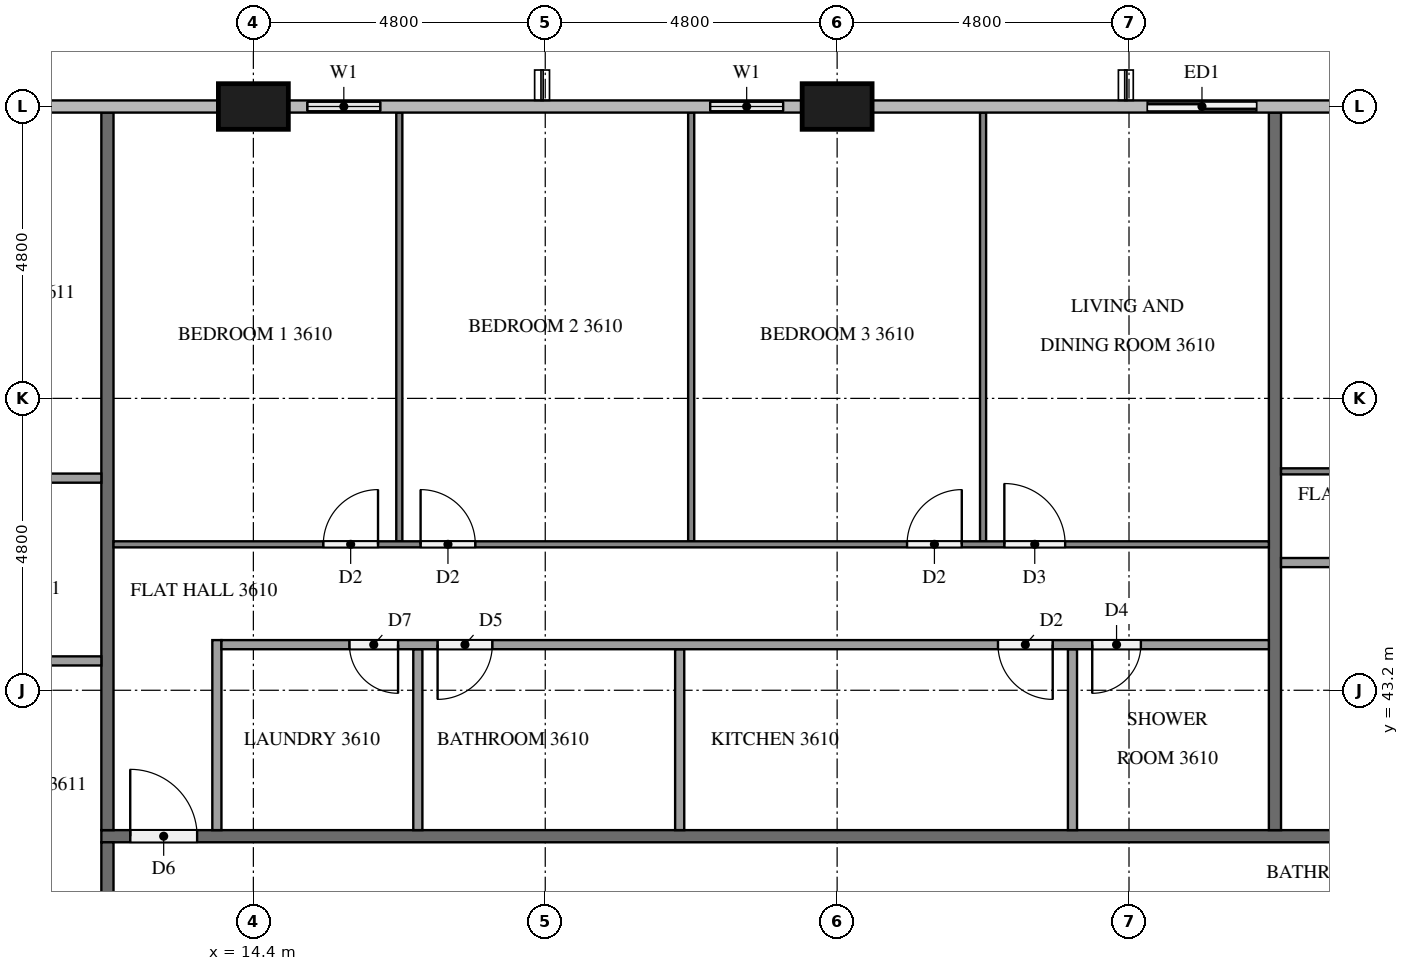
"""IFC4 building model, lengths in metres.
Left out: names, types, materials, properties, quantities, classifications, styles, units other than length and angle.
Written with IfcOpenShell. Run it as: python <this file> out.ifc"""

import sys

from ifc_helpers import new_model, si_unit, direction, frame, frame_2d, origin, origin_2d, place, context, subcontext, project, spatial, rectangle, extrude, element, fill, save


model = new_model("IFC4")
c1 = context("Model", 3, precision=1e-05, world=origin(), true_north=direction((0.0, 1.0)))
c2 = subcontext(c1, "Body", "Model", "MODEL_VIEW")
j1 = project(units=[si_unit("LENGTHUNIT", "METRE"), si_unit("PLANEANGLEUNIT", "RADIAN")], contexts=[c1])
p1 = place(None, origin())
s1 = spatial("IfcSite", under=j1, at=p1, CompositionType="ELEMENT")
p2 = place(p1, origin())
s2 = spatial("IfcBuilding", under=s1, at=p2, CompositionType="ELEMENT")
p3 = place(p2, frame((0.0, 0.0, 140.1)))
s3 = spatial("IfcBuildingStorey", under=s2, at=p3, CompositionType="ELEMENT", Elevation=140.1)
for number, where, z_axis, x_axis in (
    (1, (24.0, 52.8, 0.0), (0.0, 0.0, 1.0), (1.0, 0.0, 0.0)),
    (2, (14.4, 52.8, 0.0), (0.0, 0.0, 1.0), (1.0, 0.0, 0.0)),
):
    element("IfcColumn", number, at=place(p3, frame(where, z_axis=z_axis, x_axis=x_axis)), inside=s3, PredefinedType="COLUMN", context=c2, shape_type="SweptSolid", body=[
        extrude(rectangle(XDim=1.15, YDim=0.75, at=origin_2d()), origin(), (0.0, 0.0, 1.0), 3.1),
    ])
p4 = place(p3, frame((31.2, 52.8, 0.0), z_axis=(0.0, 0.0, 1.0), x_axis=(-1.0, 0.0, 0.0)))
e3 = element("IfcWall", 3, at=p4, inside=s3, PredefinedType="SOLIDWALL", context=c2, shape_type="SweptSolid", body=[
    extrude(rectangle(XDim=2.4, YDim=0.15, at=frame_2d((1.2, 0.0))), origin(), (0.0, 0.0, 1.0), 3.1),
])
p5 = place(p4, frame((0.3, 0.0, 0.0)))
e4 = element("IfcOpeningElement", 4, at=p5, cuts=e3, PredefinedType="OPENING", context=c2, shape_type="SweptSolid", body=[
    extrude(rectangle(XDim=1.8, YDim=2.4, at=frame_2d((0.9, 1.2))), frame((0.0, 0.085, 0.0), z_axis=(0.0, -1.0, 0.0), x_axis=(1.0, 0.0, 0.0)), (0.0, 0.0, 1.0), 0.17),
])
p6 = place(p3, frame((23.425, 52.8, 0.0), z_axis=(0.0, 0.0, 1.0), x_axis=(-1.0, 0.0, 0.0)))
e5 = element("IfcWall", 5, at=p6, inside=s3, PredefinedType="SOLIDWALL", context=c2, shape_type="SweptSolid", body=[
    extrude(rectangle(XDim=1.825, YDim=0.15, at=frame_2d((0.913, 0.0))), origin(), (0.0, 0.0, 1.0), 3.1),
])
p7 = place(p6, frame((0.312, 0.0, 0.9)))
e6 = element("IfcOpeningElement", 6, at=p7, cuts=e5, PredefinedType="OPENING", context=c2, shape_type="SweptSolid", body=[
    extrude(rectangle(XDim=1.2, YDim=1.4, at=frame_2d((0.6, 0.7))), frame((0.0, 0.085, 0.0), z_axis=(0.0, -1.0, 0.0), x_axis=(1.0, 0.0, 0.0)), (0.0, 0.0, 1.0), 0.17),
])
p8 = place(p3, frame((16.8, 52.8, 0.0), z_axis=(0.0, 0.0, 1.0), x_axis=(-1.0, 0.0, 0.0)))
e7 = element("IfcWall", 7, at=p8, inside=s3, PredefinedType="SOLIDWALL", context=c2, shape_type="SweptSolid", body=[
    extrude(rectangle(XDim=1.825, YDim=0.15, at=frame_2d((0.913, 0.0))), origin(), (0.0, 0.0, 1.0), 3.1),
])
p9 = place(p8, frame((0.312, 0.0, 0.9)))
e8 = element("IfcOpeningElement", 8, at=p9, cuts=e7, PredefinedType="OPENING", context=c2, shape_type="SweptSolid", body=[
    extrude(rectangle(XDim=1.2, YDim=1.4, at=frame_2d((0.6, 0.7))), frame((0.0, 0.085, 0.0), z_axis=(0.0, -1.0, 0.0), x_axis=(1.0, 0.0, 0.0)), (0.0, 0.0, 1.0), 0.17),
])
p10 = place(p3, frame((11.9, 40.8, 0.0), z_axis=(0.0, 0.0, 1.0), x_axis=(1.0, 0.0, 0.0)))
e9 = element("IfcWall", 9, at=p10, inside=s3, PredefinedType="PARTITIONING", context=c2, shape_type="SweptSolid", body=[
    extrude(rectangle(XDim=38.6, YDim=0.2, at=frame_2d((19.3, 0.0))), origin(), (0.0, 0.0, 1.0), 3.1),
])
p11 = place(p10, frame((37.075, 0.0, 0.0)))
e10 = element("IfcOpeningElement", 10, at=p11, cuts=e9, PredefinedType="OPENING", context=c2, shape_type="SweptSolid", body=[
    extrude(rectangle(XDim=1.0, YDim=2.1, at=frame_2d((0.5, 1.05))), frame((0.0, 0.11, 0.0), z_axis=(0.0, -1.0, 0.0), x_axis=(1.0, 0.0, 0.0)), (0.0, 0.0, 1.0), 0.22),
])
p12 = place(p10, frame((25.075, 0.0, 0.0)))
e11 = element("IfcOpeningElement", 11, at=p12, cuts=e9, PredefinedType="OPENING", context=c2, shape_type="SweptSolid", body=[
    extrude(rectangle(XDim=1.0, YDim=2.1, at=frame_2d((0.5, 1.05))), frame((0.0, 0.11, 0.0), z_axis=(0.0, -1.0, 0.0), x_axis=(1.0, 0.0, 0.0)), (0.0, 0.0, 1.0), 0.22),
])
p13 = place(p10, frame((0.475, 0.0, 0.0)))
e12 = element("IfcOpeningElement", 12, at=p13, cuts=e9, PredefinedType="OPENING", context=c2, shape_type="SweptSolid", body=[
    extrude(rectangle(XDim=1.1, YDim=2.1, at=frame_2d((0.55, 1.05))), frame((0.0, 0.11, 0.0), z_axis=(0.0, -1.0, 0.0), x_axis=(1.0, 0.0, 0.0)), (0.0, 0.0, 1.0), 0.22),
])
p14 = place(p3, frame((12.0, 37.9, 0.0), z_axis=(0.0, 0.0, 1.0), x_axis=(0.0, 1.0, 0.0)))
e13 = element("IfcWall", 13, at=p14, inside=s3, PredefinedType="PARTITIONING", context=c2, shape_type="SweptSolid", body=[
    extrude(rectangle(XDim=2.8, YDim=0.2, at=frame_2d((1.4, 0.0))), origin(), (0.0, 0.0, 1.0), 3.1),
])
p15 = place(p14, frame((0.325, 0.0, 0.0)))
e14 = element("IfcOpeningElement", 14, at=p15, cuts=e13, PredefinedType="OPENING", context=c2, shape_type="SweptSolid", body=[
    extrude(rectangle(XDim=1.0, YDim=2.1, at=frame_2d((0.5, 1.05))), frame((0.0, 0.11, 0.0), z_axis=(0.0, -1.0, 0.0), x_axis=(1.0, 0.0, 0.0)), (0.0, 0.0, 1.0), 0.22),
])
for number, where, z_axis, x_axis in (
    (15, (31.2, 52.7, 0.0), (0.0, 0.0, 1.0), (0.0, -1.0, 0.0)),
    (16, (12.0, 52.7, 0.0), (0.0, 0.0, 1.0), (0.0, -1.0, 0.0)),
):
    element("IfcWall", number, at=place(p3, frame(where, z_axis=z_axis, x_axis=x_axis)), inside=s3, PredefinedType="PARTITIONING", context=c2, shape_type="SweptSolid", body=[
        extrude(rectangle(XDim=11.8, YDim=0.2, at=frame_2d((5.9, 0.0))), origin(), (0.0, 0.0, 1.0), 3.1),
    ])
p16 = place(p3, frame((31.3, 46.8, 0.0), z_axis=(0.0, 0.0, 1.0), x_axis=(1.0, 0.0, 0.0)))
e17 = element("IfcWall", 17, at=p16, inside=s3, PredefinedType="PARTITIONING", context=c2, shape_type="SweptSolid", body=[
    extrude(rectangle(XDim=7.0, YDim=0.1, at=frame_2d((3.5, 0.0))), origin(), (0.0, 0.0, 1.0), 3.1),
])
p17 = place(p16, frame((5.7, 0.0, 0.0)))
e18 = element("IfcOpeningElement", 18, at=p17, cuts=e17, PredefinedType="OPENING", context=c2, shape_type="SweptSolid", body=[
    extrude(rectangle(XDim=1.0, YDim=2.1, at=frame_2d((0.5, 1.05))), frame((0.0, 0.06, 0.0), z_axis=(0.0, -1.0, 0.0), x_axis=(1.0, 0.0, 0.0)), (0.0, 0.0, 1.0), 0.12),
])
p18 = place(p3, frame((36.525, 45.3, 0.0), z_axis=(0.0, 0.0, 1.0), x_axis=(-1.0, 0.0, 0.0)))
e19 = element("IfcWall", 19, at=p18, inside=s3, PredefinedType="PARTITIONING", context=c2, shape_type="SweptSolid", body=[
    extrude(rectangle(XDim=5.225, YDim=0.15, at=frame_2d((2.612, 0.0))), origin(), (0.0, 0.0, 1.0), 3.1),
])
p19 = place(p18, frame((1.91, 0.0, 0.0)))
e20 = element("IfcOpeningElement", 20, at=p19, cuts=e19, PredefinedType="OPENING", context=c2, shape_type="SweptSolid", body=[
    extrude(rectangle(XDim=0.9, YDim=2.1, at=frame_2d((0.45, 1.05))), frame((0.0, 0.085, 0.0), z_axis=(0.0, -1.0, 0.0), x_axis=(1.0, 0.0, 0.0)), (0.0, 0.0, 1.0), 0.17),
])
p20 = place(p18, frame((3.46, 0.0, 0.0)))
e21 = element("IfcOpeningElement", 21, at=p20, cuts=e19, PredefinedType="OPENING", context=c2, shape_type="SweptSolid", body=[
    extrude(rectangle(XDim=0.8, YDim=2.1, at=frame_2d((0.4, 1.05))), frame((0.0, 0.085, 0.0), z_axis=(0.0, -1.0, 0.0), x_axis=(1.0, 0.0, 0.0)), (0.0, 0.0, 1.0), 0.17),
])
for number, where, z_axis, x_axis in (
    (22, (16.8, 45.65, 0.0), (0.0, 0.0, 1.0), (0.0, 1.0, 0.0)),
    (23, (21.6, 45.65, 0.0), (0.0, 0.0, 1.0), (0.0, 1.0, 0.0)),
    (24, (26.4, 45.65, 0.0), (0.0, 0.0, 1.0), (0.0, 1.0, 0.0)),
):
    element("IfcWall", number, at=place(p3, frame(where, z_axis=z_axis, x_axis=x_axis)), inside=s3, PredefinedType="PARTITIONING", context=c2, shape_type="SweptSolid", body=[
        extrude(rectangle(XDim=7.05, YDim=0.1, at=frame_2d((3.525, 0.0))), origin(), (0.0, 0.0, 1.0), 3.1),
    ])
p21 = place(p3, frame((12.1, 45.6, 0.0), z_axis=(0.0, 0.0, 1.0), x_axis=(1.0, 0.0, 0.0)))
e25 = element("IfcWall", 25, at=p21, inside=s3, PredefinedType="PARTITIONING", context=c2, shape_type="SweptSolid", body=[
    extrude(rectangle(XDim=19.0, YDim=0.1, at=frame_2d((9.5, 0.0))), origin(), (0.0, 0.0, 1.0), 3.1),
])
p22 = place(p21, frame((3.45, 0.0, 0.0)))
e26 = element("IfcOpeningElement", 26, at=p22, cuts=e25, PredefinedType="OPENING", context=c2, shape_type="SweptSolid", body=[
    extrude(rectangle(XDim=0.9, YDim=2.1, at=frame_2d((0.45, 1.05))), frame((0.0, 0.06, 0.0), z_axis=(0.0, -1.0, 0.0), x_axis=(1.0, 0.0, 0.0)), (0.0, 0.0, 1.0), 0.12),
])
p23 = place(p21, frame((5.05, 0.0, 0.0)))
e27 = element("IfcOpeningElement", 27, at=p23, cuts=e25, PredefinedType="OPENING", context=c2, shape_type="SweptSolid", body=[
    extrude(rectangle(XDim=0.9, YDim=2.1, at=frame_2d((0.45, 1.05))), frame((0.0, 0.06, 0.0), z_axis=(0.0, -1.0, 0.0), x_axis=(1.0, 0.0, 0.0)), (0.0, 0.0, 1.0), 0.12),
])
p24 = place(p21, frame((13.05, 0.0, 0.0)))
e28 = element("IfcOpeningElement", 28, at=p24, cuts=e25, PredefinedType="OPENING", context=c2, shape_type="SweptSolid", body=[
    extrude(rectangle(XDim=0.9, YDim=2.1, at=frame_2d((0.45, 1.05))), frame((0.0, 0.06, 0.0), z_axis=(0.0, -1.0, 0.0), x_axis=(1.0, 0.0, 0.0)), (0.0, 0.0, 1.0), 0.12),
])
p25 = place(p21, frame((14.65, 0.0, 0.0)))
e29 = element("IfcOpeningElement", 29, at=p25, cuts=e25, PredefinedType="OPENING", context=c2, shape_type="SweptSolid", body=[
    extrude(rectangle(XDim=1.0, YDim=2.1, at=frame_2d((0.5, 1.05))), frame((0.0, 0.06, 0.0), z_axis=(0.0, -1.0, 0.0), x_axis=(1.0, 0.0, 0.0)), (0.0, 0.0, 1.0), 0.12),
])
for number, where, z_axis, x_axis in (
    (30, (17.105, 40.9, 0.0), (0.0, 0.0, 1.0), (0.0, 1.0, 0.0)),
    (31, (21.411, 40.9, 0.0), (0.0, 0.0, 1.0), (0.0, 1.0, 0.0)),
    (32, (27.87, 40.9, 0.0), (0.0, 0.0, 1.0), (0.0, 1.0, 0.0)),
):
    element("IfcWall", number, at=place(p3, frame(where, z_axis=z_axis, x_axis=x_axis)), inside=s3, PredefinedType="PARTITIONING", context=c2, shape_type="SweptSolid", body=[
        extrude(rectangle(XDim=2.975, YDim=0.15, at=frame_2d((1.488, 0.0))), origin(), (0.0, 0.0, 1.0), 3.1),
    ])
p26 = place(p3, frame((13.8, 40.9, 0.0), z_axis=(0.0, 0.0, 1.0), x_axis=(0.0, 1.0, 0.0)))
e33 = element("IfcWall", 33, at=p26, inside=s3, PredefinedType="PARTITIONING", context=c2, shape_type="SweptSolid", body=[
    extrude(rectangle(XDim=3.125, YDim=0.15, at=frame_2d((1.562, 0.0))), origin(), (0.0, 0.0, 1.0), 3.1),
])
p27 = place(p3, frame((31.1, 43.95, 0.0), z_axis=(0.0, 0.0, 1.0), x_axis=(-1.0, 0.0, 0.0)))
e34 = element("IfcWall", 34, at=p27, inside=s3, PredefinedType="PARTITIONING", context=c2, shape_type="SweptSolid", body=[
    extrude(rectangle(XDim=17.225, YDim=0.15, at=frame_2d((8.613, 0.0))), origin(), (0.0, 0.0, 1.0), 3.1),
])
p28 = place(p27, frame((14.32, 0.0, 0.0)))
e35 = element("IfcOpeningElement", 35, at=p28, cuts=e34, PredefinedType="OPENING", context=c2, shape_type="SweptSolid", body=[
    extrude(rectangle(XDim=0.8, YDim=2.1, at=frame_2d((0.4, 1.05))), frame((0.0, 0.085, 0.0), z_axis=(0.0, -1.0, 0.0), x_axis=(1.0, 0.0, 0.0)), (0.0, 0.0, 1.0), 0.17),
])
p29 = place(p27, frame((12.77, 0.0, 0.0)))
e36 = element("IfcOpeningElement", 36, at=p29, cuts=e34, PredefinedType="OPENING", context=c2, shape_type="SweptSolid", body=[
    extrude(rectangle(XDim=0.9, YDim=2.1, at=frame_2d((0.45, 1.05))), frame((0.0, 0.085, 0.0), z_axis=(0.0, -1.0, 0.0), x_axis=(1.0, 0.0, 0.0)), (0.0, 0.0, 1.0), 0.17),
])
p30 = place(p27, frame((3.555, 0.0, 0.0)))
e37 = element("IfcOpeningElement", 37, at=p30, cuts=e34, PredefinedType="OPENING", context=c2, shape_type="SweptSolid", body=[
    extrude(rectangle(XDim=0.9, YDim=2.1, at=frame_2d((0.45, 1.05))), frame((0.0, 0.085, 0.0), z_axis=(0.0, -1.0, 0.0), x_axis=(1.0, 0.0, 0.0)), (0.0, 0.0, 1.0), 0.17),
])
p31 = place(p27, frame((2.105, 0.0, 0.0)))
e38 = element("IfcOpeningElement", 38, at=p31, cuts=e34, PredefinedType="OPENING", context=c2, shape_type="SweptSolid", body=[
    extrude(rectangle(XDim=0.8, YDim=2.1, at=frame_2d((0.4, 1.05))), frame((0.0, 0.085, 0.0), z_axis=(0.0, -1.0, 0.0), x_axis=(1.0, 0.0, 0.0)), (0.0, 0.0, 1.0), 0.17),
])
for number, where, z_axis, x_axis in (
    (39, (11.9, 43.683, 0.0), (0.0, 0.0, 1.0), (-1.0, 0.0, 0.0)),
    (40, (11.9, 46.688, 0.0), (0.0, 0.0, 1.0), (-1.0, 0.0, 0.0)),
):
    element("IfcWall", number, at=place(p3, frame(where, z_axis=z_axis, x_axis=x_axis)), inside=s3, PredefinedType="PARTITIONING", context=c2, shape_type="SweptSolid", body=[
        extrude(rectangle(XDim=2.975, YDim=0.15, at=frame_2d((1.487, 0.0))), origin(), (0.0, 0.0, 1.0), 3.1),
    ])
p32 = place(p5, origin())
e41 = element("IfcDoor", 41, at=p32, inside=s3, OperationType="SLIDING_TO_LEFT", PredefinedType="DOOR", context=c2, shape_type="SweptSolid", body=[
    extrude(rectangle(XDim=1.8, YDim=2.4, at=frame_2d((0.9, 1.2))), frame((0.0, 0.025, 0.0), z_axis=(0.0, -1.0, 0.0), x_axis=(1.0, 0.0, 0.0)), (0.0, 0.0, 1.0), 0.05),
])
fill(e4, e41)
p33 = place(p7, origin())
e42 = element("IfcWindow", 42, at=p33, inside=s3, PartitioningType="SINGLE_PANEL", PredefinedType="WINDOW", context=c2, shape_type="SweptSolid", body=[
    extrude(rectangle(XDim=1.2, YDim=1.4, at=frame_2d((0.6, 0.7))), frame((0.0, 0.03, 0.0), z_axis=(0.0, -1.0, 0.0), x_axis=(1.0, 0.0, 0.0)), (0.0, 0.0, 1.0), 0.06),
])
fill(e6, e42)
p34 = place(p9, origin())
e43 = element("IfcWindow", 43, at=p34, inside=s3, PartitioningType="SINGLE_PANEL", PredefinedType="WINDOW", context=c2, shape_type="SweptSolid", body=[
    extrude(rectangle(XDim=1.2, YDim=1.4, at=frame_2d((0.6, 0.7))), frame((0.0, 0.03, 0.0), z_axis=(0.0, -1.0, 0.0), x_axis=(1.0, 0.0, 0.0)), (0.0, 0.0, 1.0), 0.06),
])
fill(e8, e43)
p35 = place(p13, origin())
e44 = element("IfcDoor", 44, at=p35, inside=s3, OperationType="SINGLE_SWING_LEFT", PredefinedType="DOOR", context=c2, shape_type="SweptSolid", body=[
    extrude(rectangle(XDim=1.1, YDim=2.1, at=frame_2d((0.55, 1.05))), frame((0.0, 0.025, 0.0), z_axis=(0.0, -1.0, 0.0), x_axis=(1.0, 0.0, 0.0)), (0.0, 0.0, 1.0), 0.05),
])
fill(e12, e44)
p36 = place(p22, origin())
e45 = element("IfcDoor", 45, at=p36, inside=s3, OperationType="SINGLE_SWING_RIGHT", PredefinedType="DOOR", context=c2, shape_type="SweptSolid", body=[
    extrude(rectangle(XDim=0.9, YDim=2.1, at=frame_2d((0.45, 1.05))), frame((0.0, 0.025, 0.0), z_axis=(0.0, -1.0, 0.0), x_axis=(1.0, 0.0, 0.0)), (0.0, 0.0, 1.0), 0.05),
])
fill(e26, e45)
p37 = place(p23, origin())
e46 = element("IfcDoor", 46, at=p37, inside=s3, OperationType="SINGLE_SWING_LEFT", PredefinedType="DOOR", context=c2, shape_type="SweptSolid", body=[
    extrude(rectangle(XDim=0.9, YDim=2.1, at=frame_2d((0.45, 1.05))), frame((0.0, 0.025, 0.0), z_axis=(0.0, -1.0, 0.0), x_axis=(1.0, 0.0, 0.0)), (0.0, 0.0, 1.0), 0.05),
])
fill(e27, e46)
p38 = place(p24, origin())
e47 = element("IfcDoor", 47, at=p38, inside=s3, OperationType="SINGLE_SWING_RIGHT", PredefinedType="DOOR", context=c2, shape_type="SweptSolid", body=[
    extrude(rectangle(XDim=0.9, YDim=2.1, at=frame_2d((0.45, 1.05))), frame((0.0, 0.025, 0.0), z_axis=(0.0, -1.0, 0.0), x_axis=(1.0, 0.0, 0.0)), (0.0, 0.0, 1.0), 0.05),
])
fill(e28, e47)
p39 = place(p25, origin())
e48 = element("IfcDoor", 48, at=p39, inside=s3, OperationType="SINGLE_SWING_LEFT", PredefinedType="DOOR", context=c2, shape_type="SweptSolid", body=[
    extrude(rectangle(XDim=1.0, YDim=2.1, at=frame_2d((0.5, 1.05))), frame((0.0, 0.025, 0.0), z_axis=(0.0, -1.0, 0.0), x_axis=(1.0, 0.0, 0.0)), (0.0, 0.0, 1.0), 0.05),
])
fill(e29, e48)
p40 = place(p28, origin())
e49 = element("IfcDoor", 49, at=p40, inside=s3, OperationType="SINGLE_SWING_LEFT", PredefinedType="DOOR", context=c2, shape_type="SweptSolid", body=[
    extrude(rectangle(XDim=0.8, YDim=2.1, at=frame_2d((0.4, 1.05))), frame((0.0, 0.025, 0.0), z_axis=(0.0, -1.0, 0.0), x_axis=(1.0, 0.0, 0.0)), (0.0, 0.0, 1.0), 0.05),
])
fill(e35, e49)
p41 = place(p29, origin())
e50 = element("IfcDoor", 50, at=p41, inside=s3, OperationType="SINGLE_SWING_RIGHT", PredefinedType="DOOR", context=c2, shape_type="SweptSolid", body=[
    extrude(rectangle(XDim=0.9, YDim=2.1, at=frame_2d((0.45, 1.05))), frame((0.0, 0.025, 0.0), z_axis=(0.0, -1.0, 0.0), x_axis=(1.0, 0.0, 0.0)), (0.0, 0.0, 1.0), 0.05),
])
fill(e36, e50)
p42 = place(p30, origin())
e51 = element("IfcDoor", 51, at=p42, inside=s3, OperationType="SINGLE_SWING_LEFT", PredefinedType="DOOR", context=c2, shape_type="SweptSolid", body=[
    extrude(rectangle(XDim=0.9, YDim=2.1, at=frame_2d((0.45, 1.05))), frame((0.0, 0.025, 0.0), z_axis=(0.0, -1.0, 0.0), x_axis=(1.0, 0.0, 0.0)), (0.0, 0.0, 1.0), 0.05),
])
fill(e37, e51)
p43 = place(p31, origin())
e52 = element("IfcDoor", 52, at=p43, inside=s3, OperationType="SINGLE_SWING_RIGHT", PredefinedType="DOOR", context=c2, shape_type="SweptSolid", body=[
    extrude(rectangle(XDim=0.8, YDim=2.1, at=frame_2d((0.4, 1.05))), frame((0.0, 0.025, 0.0), z_axis=(0.0, -1.0, 0.0), x_axis=(1.0, 0.0, 0.0)), (0.0, 0.0, 1.0), 0.05),
])
fill(e38, e52)
save(model, sys.argv[1])
